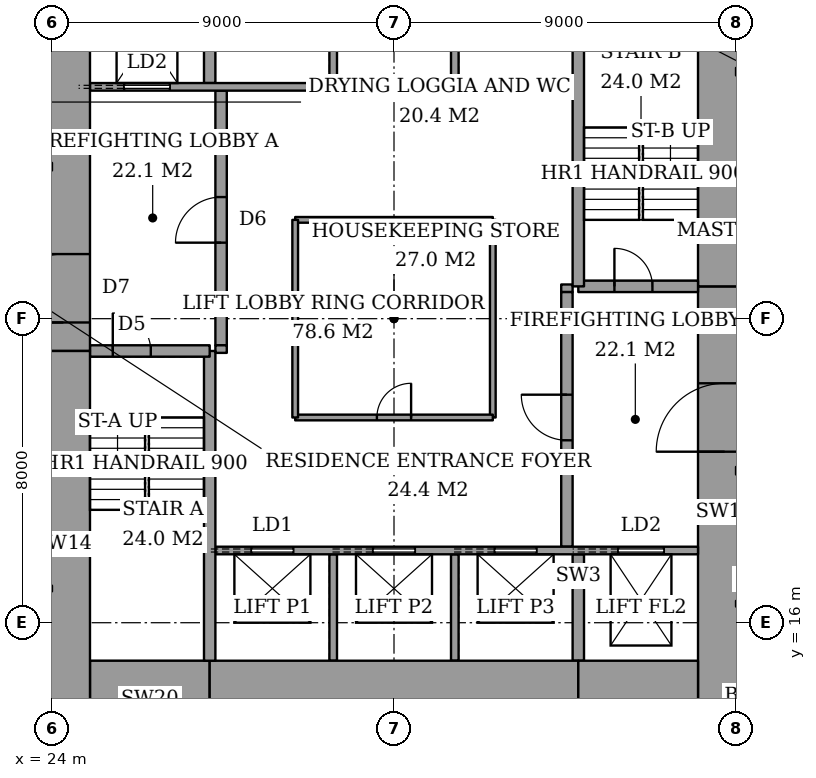
"""IFC4 building model, lengths in metres.
Left out: names, types, materials, properties, quantities, classifications, styles, units other than length and angle.
Written with IfcOpenShell. Run it as: python <this file> out.ifc"""

import sys

from ifc_helpers import new_model, si_unit, direction, frame, frame_2d, origin, place, context, subcontext, project, spatial, rectangle, extrude, element, fill, save


model = new_model("IFC4")
c1 = context("Model", 3, precision=1e-05, world=origin(), true_north=direction((0.0, 1.0)))
c2 = subcontext(c1, "Body", "Model", "MODEL_VIEW")
j1 = project(units=[si_unit("LENGTHUNIT", "METRE"), si_unit("PLANEANGLEUNIT", "RADIAN")], contexts=[c1])
p1 = place(None, origin())
s1 = spatial("IfcSite", under=j1, at=p1, CompositionType="ELEMENT")
p2 = place(p1, origin())
s2 = spatial("IfcBuilding", under=s1, at=p2, CompositionType="ELEMENT")
p3 = place(p2, frame((0.0, 0.0, 62.0)))
s3 = spatial("IfcBuildingStorey", under=s2, at=p3, CompositionType="ELEMENT", Elevation=62.0)
p4 = place(p3, frame((25.0, 14.0, 0.0), z_axis=(0.0, 0.0, 1.0), x_axis=(1.0, 0.0, 0.0)))
e1 = element("IfcWall", 1, at=p4, inside=s3, PredefinedType="SHEAR", context=c2, shape_type="SweptSolid", body=[
    extrude(rectangle(XDim=3.15, YDim=2.0, at=frame_2d((1.575, 0.0))), origin(), (0.0, 0.0, 1.0), 3.6),
])
p5 = place(p3, frame((28.15, 14.0, 0.0), z_axis=(0.0, 0.0, 1.0), x_axis=(1.0, 0.0, 0.0)))
e2 = element("IfcWall", 2, at=p5, inside=s3, PredefinedType="SHEAR", context=c2, shape_type="SweptSolid", body=[
    extrude(rectangle(XDim=9.7, YDim=2.0, at=frame_2d((4.85, 0.0))), origin(), (0.0, 0.0, 1.0), 3.6),
])
p6 = place(p3, frame((37.85, 14.0, 0.0), z_axis=(0.0, 0.0, 1.0), x_axis=(1.0, 0.0, 0.0)))
e3 = element("IfcWall", 3, at=p6, inside=s3, PredefinedType="SHEAR", context=c2, shape_type="SweptSolid", body=[
    extrude(rectangle(XDim=3.15, YDim=2.0, at=frame_2d((1.575, 0.0))), origin(), (0.0, 0.0, 1.0), 3.6),
])
p7 = place(p3, frame((24.3, 13.0, 0.0), z_axis=(0.0, 0.0, 1.0), x_axis=(0.0, 1.0, 0.0)))
e4 = element("IfcWall", 4, at=p7, inside=s3, PredefinedType="SHEAR", context=c2, shape_type="SweptSolid", body=[
    extrude(rectangle(XDim=10.15, YDim=1.4, at=frame_2d((5.075, 0.0))), origin(), (0.0, 0.0, 1.0), 3.6),
])
p8 = place(p3, frame((24.3, 23.15, 0.0), z_axis=(0.0, 0.0, 1.0), x_axis=(0.0, 1.0, 0.0)))
e5 = element("IfcWall", 5, at=p8, inside=s3, PredefinedType="SHEAR", context=c2, shape_type="SweptSolid", body=[
    extrude(rectangle(XDim=11.85, YDim=1.4, at=frame_2d((5.925, 0.0))), origin(), (0.0, 0.0, 1.0), 3.6),
])
p9 = place(p8, frame((0.75, 0.0, 0.0)))
e6 = element("IfcOpeningElement", 6, at=p9, cuts=e5, PredefinedType="OPENING", context=c2, shape_type="SweptSolid", body=[
    extrude(rectangle(XDim=1.8, YDim=2.4, at=frame_2d((0.9, 1.2))), frame((0.0, 0.71, 0.0), z_axis=(0.0, -1.0, 0.0), x_axis=(1.0, 0.0, 0.0)), (0.0, 0.0, 1.0), 1.42),
])
p10 = place(p3, frame((41.7, 13.0, 0.0), z_axis=(0.0, 0.0, 1.0), x_axis=(0.0, 1.0, 0.0)))
e7 = element("IfcWall", 7, at=p10, inside=s3, PredefinedType="SHEAR", context=c2, shape_type="SweptSolid", body=[
    extrude(rectangle(XDim=11.85, YDim=1.4, at=frame_2d((5.925, 0.0))), origin(), (0.0, 0.0, 1.0), 3.6),
])
p11 = place(p10, frame((7.5, 0.0, 0.0)))
e8 = element("IfcOpeningElement", 8, at=p11, cuts=e7, PredefinedType="OPENING", context=c2, shape_type="SweptSolid", body=[
    extrude(rectangle(XDim=1.8, YDim=2.4, at=frame_2d((0.9, 1.2))), frame((0.0, 0.71, 0.0), z_axis=(0.0, -1.0, 0.0), x_axis=(1.0, 0.0, 0.0)), (0.0, 0.0, 1.0), 1.42),
])
p12 = place(p3, frame((41.7, 24.85, 0.0), z_axis=(0.0, 0.0, 1.0), x_axis=(0.0, 1.0, 0.0)))
e9 = element("IfcWall", 9, at=p12, inside=s3, PredefinedType="SHEAR", context=c2, shape_type="SweptSolid", body=[
    extrude(rectangle(XDim=10.15, YDim=1.4, at=frame_2d((5.075, 0.0))), origin(), (0.0, 0.0, 1.0), 3.6),
])
p13 = place(p3, frame((28.15, 15.0, 0.0), z_axis=(0.0, 0.0, 1.0), x_axis=(0.0, 1.0, 0.0)))
e10 = element("IfcWall", 10, at=p13, inside=s3, PredefinedType="SHEAR", context=c2, shape_type="SweptSolid", body=[
    extrude(rectangle(XDim=8.15, YDim=0.3, at=frame_2d((4.075, 0.0))), origin(), (0.0, 0.0, 1.0), 3.6),
])
p14 = place(p3, frame((25.0, 23.15, 0.0), z_axis=(0.0, 0.0, 1.0), x_axis=(1.0, 0.0, 0.0)))
e11 = element("IfcWall", 11, at=p14, inside=s3, PredefinedType="SHEAR", context=c2, shape_type="SweptSolid", body=[
    extrude(rectangle(XDim=3.15, YDim=0.3, at=frame_2d((1.575, 0.0))), origin(), (0.0, 0.0, 1.0), 3.6),
])
p15 = place(p14, frame((0.6, 0.0, 0.0)))
e12 = element("IfcOpeningElement", 12, at=p15, cuts=e11, PredefinedType="OPENING", context=c2, shape_type="SweptSolid", body=[
    extrude(rectangle(XDim=1.0, YDim=2.1, at=frame_2d((0.5, 1.05))), frame((0.0, 0.16, 0.0), z_axis=(0.0, -1.0, 0.0), x_axis=(1.0, 0.0, 0.0)), (0.0, 0.0, 1.0), 0.32),
])
p16 = place(p3, frame((37.85, 24.85, 0.0), z_axis=(0.0, 0.0, 1.0), x_axis=(0.0, 1.0, 0.0)))
e13 = element("IfcWall", 13, at=p16, inside=s3, PredefinedType="SHEAR", context=c2, shape_type="SweptSolid", body=[
    extrude(rectangle(XDim=8.15, YDim=0.3, at=frame_2d((4.075, 0.0))), origin(), (0.0, 0.0, 1.0), 3.6),
])
p17 = place(p3, frame((37.85, 24.85, 0.0), z_axis=(0.0, 0.0, 1.0), x_axis=(1.0, 0.0, 0.0)))
e14 = element("IfcWall", 14, at=p17, inside=s3, PredefinedType="SHEAR", context=c2, shape_type="SweptSolid", body=[
    extrude(rectangle(XDim=3.15, YDim=0.3, at=frame_2d((1.575, 0.0))), origin(), (0.0, 0.0, 1.0), 3.6),
])
p18 = place(p17, frame((0.95, 0.0, 0.0)))
e15 = element("IfcOpeningElement", 15, at=p18, cuts=e14, PredefinedType="OPENING", context=c2, shape_type="SweptSolid", body=[
    extrude(rectangle(XDim=1.0, YDim=2.1, at=frame_2d((0.5, 1.05))), frame((0.0, 0.16, 0.0), z_axis=(0.0, -1.0, 0.0), x_axis=(1.0, 0.0, 0.0)), (0.0, 0.0, 1.0), 0.32),
])
p19 = place(p3, frame((28.45, 23.3, 0.0), z_axis=(0.0, 0.0, 1.0), x_axis=(0.0, 1.0, 0.0)))
e16 = element("IfcWall", 16, at=p19, inside=s3, PredefinedType="PARTITIONING", context=c2, shape_type="SweptSolid", body=[
    extrude(rectangle(XDim=6.7, YDim=0.3, at=frame_2d((3.35, 0.0))), origin(), (0.0, 0.0, 1.0), 3.6),
])
p20 = place(p19, frame((2.7, 0.0, 0.0)))
e17 = element("IfcOpeningElement", 17, at=p20, cuts=e16, PredefinedType="OPENING", context=c2, shape_type="SweptSolid", body=[
    extrude(rectangle(XDim=1.2, YDim=2.1, at=frame_2d((0.6, 1.05))), frame((0.0, 0.16, 0.0), z_axis=(0.0, -1.0, 0.0), x_axis=(1.0, 0.0, 0.0)), (0.0, 0.0, 1.0), 0.32),
])
p21 = place(p3, frame((37.55, 18.0, 0.0), z_axis=(0.0, 0.0, 1.0), x_axis=(0.0, 1.0, 0.0)))
e18 = element("IfcWall", 18, at=p21, inside=s3, PredefinedType="PARTITIONING", context=c2, shape_type="SweptSolid", body=[
    extrude(rectangle(XDim=6.7, YDim=0.3, at=frame_2d((3.35, 0.0))), origin(), (0.0, 0.0, 1.0), 3.6),
])
p22 = place(p21, frame((2.8, 0.0, 0.0)))
e19 = element("IfcOpeningElement", 19, at=p22, cuts=e18, PredefinedType="OPENING", context=c2, shape_type="SweptSolid", body=[
    extrude(rectangle(XDim=1.2, YDim=2.1, at=frame_2d((0.6, 1.05))), frame((0.0, 0.16, 0.0), z_axis=(0.0, -1.0, 0.0), x_axis=(1.0, 0.0, 0.0)), (0.0, 0.0, 1.0), 0.32),
])
p23 = place(p3, frame((28.3, 17.9, 0.0), z_axis=(0.0, 0.0, 1.0), x_axis=(1.0, 0.0, 0.0)))
e20 = element("IfcWall", 20, at=p23, inside=s3, PredefinedType="PARTITIONING", context=c2, shape_type="SweptSolid", body=[
    extrude(rectangle(XDim=12.7, YDim=0.2, at=frame_2d((6.35, 0.0))), origin(), (0.0, 0.0, 1.0), 3.6),
])
p24 = place(p23, frame((0.95, 0.0, 0.0)))
e21 = element("IfcOpeningElement", 21, at=p24, cuts=e20, PredefinedType="OPENING", context=c2, shape_type="SweptSolid", body=[
    extrude(rectangle(XDim=1.1, YDim=2.1, at=frame_2d((0.55, 1.05))), frame((0.0, 0.11, 0.0), z_axis=(0.0, -1.0, 0.0), x_axis=(1.0, 0.0, 0.0)), (0.0, 0.0, 1.0), 0.22),
])
p25 = place(p23, frame((4.15, 0.0, 0.0)))
e22 = element("IfcOpeningElement", 22, at=p25, cuts=e20, PredefinedType="OPENING", context=c2, shape_type="SweptSolid", body=[
    extrude(rectangle(XDim=1.1, YDim=2.1, at=frame_2d((0.55, 1.05))), frame((0.0, 0.11, 0.0), z_axis=(0.0, -1.0, 0.0), x_axis=(1.0, 0.0, 0.0)), (0.0, 0.0, 1.0), 0.22),
])
p26 = place(p23, frame((7.35, 0.0, 0.0)))
e23 = element("IfcOpeningElement", 23, at=p26, cuts=e20, PredefinedType="OPENING", context=c2, shape_type="SweptSolid", body=[
    extrude(rectangle(XDim=1.1, YDim=2.1, at=frame_2d((0.55, 1.05))), frame((0.0, 0.11, 0.0), z_axis=(0.0, -1.0, 0.0), x_axis=(1.0, 0.0, 0.0)), (0.0, 0.0, 1.0), 0.22),
])
p27 = place(p23, frame((10.6, 0.0, 0.0)))
e24 = element("IfcOpeningElement", 24, at=p27, cuts=e20, PredefinedType="OPENING", context=c2, shape_type="SweptSolid", body=[
    extrude(rectangle(XDim=1.2, YDim=2.1, at=frame_2d((0.6, 1.05))), frame((0.0, 0.11, 0.0), z_axis=(0.0, -1.0, 0.0), x_axis=(1.0, 0.0, 0.0)), (0.0, 0.0, 1.0), 0.22),
])
p28 = place(p3, frame((25.0, 30.1, 0.0), z_axis=(0.0, 0.0, 1.0), x_axis=(1.0, 0.0, 0.0)))
e25 = element("IfcWall", 25, at=p28, inside=s3, PredefinedType="PARTITIONING", context=c2, shape_type="SweptSolid", body=[
    extrude(rectangle(XDim=12.7, YDim=0.2, at=frame_2d((6.35, 0.0))), origin(), (0.0, 0.0, 1.0), 3.6),
])
p29 = place(p28, frame((0.9, 0.0, 0.0)))
e26 = element("IfcOpeningElement", 26, at=p29, cuts=e25, PredefinedType="OPENING", context=c2, shape_type="SweptSolid", body=[
    extrude(rectangle(XDim=1.2, YDim=2.1, at=frame_2d((0.6, 1.05))), frame((0.0, 0.11, 0.0), z_axis=(0.0, -1.0, 0.0), x_axis=(1.0, 0.0, 0.0)), (0.0, 0.0, 1.0), 0.22),
])
for number, where, z_axis, x_axis in (
    (27, (31.4, 15.0, 0.0), (0.0, 0.0, 1.0), (0.0, 1.0, 0.0)),
    (28, (34.6, 15.0, 0.0), (0.0, 0.0, 1.0), (0.0, 1.0, 0.0)),
):
    element("IfcWall", number, at=place(p3, frame(where, z_axis=z_axis, x_axis=x_axis)), inside=s3, PredefinedType="PARTITIONING", context=c2, shape_type="SweptSolid", body=[
        extrude(rectangle(XDim=2.8, YDim=0.2, at=frame_2d((1.4, 0.0))), origin(), (0.0, 0.0, 1.0), 3.6),
    ])
p30 = place(p3, frame((37.85, 15.0, 0.0), z_axis=(0.0, 0.0, 1.0), x_axis=(0.0, 1.0, 0.0)))
e29 = element("IfcWall", 29, at=p30, inside=s3, PredefinedType="SHEAR", context=c2, shape_type="SweptSolid", body=[
    extrude(rectangle(XDim=2.8, YDim=0.3, at=frame_2d((1.4, 0.0))), origin(), (0.0, 0.0, 1.0), 3.6),
])
for number, where, z_axis, x_axis in (
    (30, (31.4, 30.2, 0.0), (0.0, 0.0, 1.0), (0.0, 1.0, 0.0)),
    (31, (34.6, 30.2, 0.0), (0.0, 0.0, 1.0), (0.0, 1.0, 0.0)),
):
    element("IfcWall", number, at=place(p3, frame(where, z_axis=z_axis, x_axis=x_axis)), inside=s3, PredefinedType="PARTITIONING", context=c2, shape_type="SweptSolid", body=[
        extrude(rectangle(XDim=2.8, YDim=0.2, at=frame_2d((1.4, 0.0))), origin(), (0.0, 0.0, 1.0), 3.6),
    ])
p31 = place(p3, frame((28.15, 30.2, 0.0), z_axis=(0.0, 0.0, 1.0), x_axis=(0.0, 1.0, 0.0)))
e32 = element("IfcWall", 32, at=p31, inside=s3, PredefinedType="SHEAR", context=c2, shape_type="SweptSolid", body=[
    extrude(rectangle(XDim=2.8, YDim=0.3, at=frame_2d((1.4, 0.0))), origin(), (0.0, 0.0, 1.0), 3.6),
])
for number, where, z_axis, x_axis in (
    (33, (28.3, 23.2, 0.0), (0.0, 0.0, 1.0), (1.0, 0.0, 0.0)),
    (34, (37.4, 24.8, 0.0), (0.0, 0.0, 1.0), (1.0, 0.0, 0.0)),
):
    element("IfcWall", number, at=place(p3, frame(where, z_axis=z_axis, x_axis=x_axis)), inside=s3, PredefinedType="PARTITIONING", context=c2, shape_type="SweptSolid", body=[
        extrude(rectangle(XDim=0.3, YDim=0.2, at=frame_2d((0.15, 0.0))), origin(), (0.0, 0.0, 1.0), 3.6),
    ])
p32 = place(p3, frame((30.4, 21.4, 0.0), z_axis=(0.0, 0.0, 1.0), x_axis=(1.0, 0.0, 0.0)))
e35 = element("IfcWall", 35, at=p32, inside=s3, PredefinedType="PARTITIONING", context=c2, shape_type="SweptSolid", body=[
    extrude(rectangle(XDim=5.2, YDim=0.15, at=frame_2d((2.6, 0.0))), origin(), (0.0, 0.0, 1.0), 3.35),
])
p33 = place(p32, frame((2.15, 0.0, 0.0)))
e36 = element("IfcOpeningElement", 36, at=p33, cuts=e35, PredefinedType="OPENING", context=c2, shape_type="SweptSolid", body=[
    extrude(rectangle(XDim=0.9, YDim=2.1, at=frame_2d((0.45, 1.05))), frame((0.0, 0.085, 0.0), z_axis=(0.0, -1.0, 0.0), x_axis=(1.0, 0.0, 0.0)), (0.0, 0.0, 1.0), 0.17),
])
for number, where, z_axis, x_axis in (
    (37, (30.4, 26.6, 0.0), (0.0, 0.0, 1.0), (1.0, 0.0, 0.0)),
    (38, (30.4, 21.4, 0.0), (0.0, 0.0, 1.0), (0.0, 1.0, 0.0)),
    (39, (35.6, 21.4, 0.0), (0.0, 0.0, 1.0), (0.0, 1.0, 0.0)),
):
    element("IfcWall", number, at=place(p3, frame(where, z_axis=z_axis, x_axis=x_axis)), inside=s3, PredefinedType="PARTITIONING", context=c2, shape_type="SweptSolid", body=[
        extrude(rectangle(XDim=5.2, YDim=0.15, at=frame_2d((2.6, 0.0))), origin(), (0.0, 0.0, 1.0), 3.35),
    ])
p34 = place(p15, origin())
e40 = element("IfcDoor", 40, at=p34, inside=s3, OperationType="SINGLE_SWING_RIGHT", PredefinedType="DOOR", context=c2, shape_type="SweptSolid", body=[
    extrude(rectangle(XDim=1.0, YDim=2.1, at=frame_2d((0.5, 1.05))), frame((0.0, 0.025, 0.0), z_axis=(0.0, -1.0, 0.0), x_axis=(1.0, 0.0, 0.0)), (0.0, 0.0, 1.0), 0.05),
])
fill(e12, e40)
p35 = place(p18, origin())
e41 = element("IfcDoor", 41, at=p35, inside=s3, OperationType="SINGLE_SWING_RIGHT", PredefinedType="DOOR", context=c2, shape_type="SweptSolid", body=[
    extrude(rectangle(XDim=1.0, YDim=2.1, at=frame_2d((0.5, 1.05))), frame((0.0, 0.025, 0.0), z_axis=(0.0, -1.0, 0.0), x_axis=(1.0, 0.0, 0.0)), (0.0, 0.0, 1.0), 0.05),
])
fill(e15, e41)
p36 = place(p20, origin())
e42 = element("IfcDoor", 42, at=p36, inside=s3, OperationType="SINGLE_SWING_RIGHT", PredefinedType="DOOR", context=c2, shape_type="SweptSolid", body=[
    extrude(rectangle(XDim=1.2, YDim=2.1, at=frame_2d((0.6, 1.05))), frame((0.0, 0.025, 0.0), z_axis=(0.0, -1.0, 0.0), x_axis=(1.0, 0.0, 0.0)), (0.0, 0.0, 1.0), 0.05),
])
fill(e17, e42)
p37 = place(p22, origin())
e43 = element("IfcDoor", 43, at=p37, inside=s3, OperationType="SINGLE_SWING_LEFT", PredefinedType="DOOR", context=c2, shape_type="SweptSolid", body=[
    extrude(rectangle(XDim=1.2, YDim=2.1, at=frame_2d((0.6, 1.05))), frame((0.0, 0.025, 0.0), z_axis=(0.0, -1.0, 0.0), x_axis=(1.0, 0.0, 0.0)), (0.0, 0.0, 1.0), 0.05),
])
fill(e19, e43)
p38 = place(p9, origin())
e44 = element("IfcDoor", 44, at=p38, inside=s3, OperationType="DOUBLE_DOOR_DOUBLE_SWING", PredefinedType="DOOR", context=c2, shape_type="SweptSolid", body=[
    extrude(rectangle(XDim=1.8, YDim=2.4, at=frame_2d((0.9, 1.2))), frame((0.0, 0.025, 0.0), z_axis=(0.0, -1.0, 0.0), x_axis=(1.0, 0.0, 0.0)), (0.0, 0.0, 1.0), 0.05),
])
fill(e6, e44)
p39 = place(p11, origin())
e45 = element("IfcDoor", 45, at=p39, inside=s3, OperationType="DOUBLE_DOOR_DOUBLE_SWING", PredefinedType="DOOR", context=c2, shape_type="SweptSolid", body=[
    extrude(rectangle(XDim=1.8, YDim=2.4, at=frame_2d((0.9, 1.2))), frame((0.0, 0.025, 0.0), z_axis=(0.0, -1.0, 0.0), x_axis=(1.0, 0.0, 0.0)), (0.0, 0.0, 1.0), 0.05),
])
fill(e8, e45)
p40 = place(p33, origin())
e46 = element("IfcDoor", 46, at=p40, inside=s3, OperationType="SINGLE_SWING_LEFT", PredefinedType="DOOR", context=c2, shape_type="SweptSolid", body=[
    extrude(rectangle(XDim=0.9, YDim=2.1, at=frame_2d((0.45, 1.05))), frame((0.0, 0.025, 0.0), z_axis=(0.0, -1.0, 0.0), x_axis=(1.0, 0.0, 0.0)), (0.0, 0.0, 1.0), 0.05),
])
fill(e36, e46)
p41 = place(p24, origin())
e47 = element("IfcDoor", 47, at=p41, inside=s3, OperationType="SLIDING_TO_LEFT", PredefinedType="DOOR", context=c2, shape_type="SweptSolid", body=[
    extrude(rectangle(XDim=1.1, YDim=2.1, at=frame_2d((0.55, 1.05))), frame((0.0, 0.025, 0.0), z_axis=(0.0, -1.0, 0.0), x_axis=(1.0, 0.0, 0.0)), (0.0, 0.0, 1.0), 0.05),
])
fill(e21, e47)
p42 = place(p25, origin())
e48 = element("IfcDoor", 48, at=p42, inside=s3, OperationType="SLIDING_TO_LEFT", PredefinedType="DOOR", context=c2, shape_type="SweptSolid", body=[
    extrude(rectangle(XDim=1.1, YDim=2.1, at=frame_2d((0.55, 1.05))), frame((0.0, 0.025, 0.0), z_axis=(0.0, -1.0, 0.0), x_axis=(1.0, 0.0, 0.0)), (0.0, 0.0, 1.0), 0.05),
])
fill(e22, e48)
p43 = place(p26, origin())
e49 = element("IfcDoor", 49, at=p43, inside=s3, OperationType="SLIDING_TO_LEFT", PredefinedType="DOOR", context=c2, shape_type="SweptSolid", body=[
    extrude(rectangle(XDim=1.1, YDim=2.1, at=frame_2d((0.55, 1.05))), frame((0.0, 0.025, 0.0), z_axis=(0.0, -1.0, 0.0), x_axis=(1.0, 0.0, 0.0)), (0.0, 0.0, 1.0), 0.05),
])
fill(e23, e49)
p44 = place(p29, origin())
e50 = element("IfcDoor", 50, at=p44, inside=s3, OperationType="SLIDING_TO_LEFT", PredefinedType="DOOR", context=c2, shape_type="SweptSolid", body=[
    extrude(rectangle(XDim=1.2, YDim=2.1, at=frame_2d((0.6, 1.05))), frame((0.0, 0.025, 0.0), z_axis=(0.0, -1.0, 0.0), x_axis=(1.0, 0.0, 0.0)), (0.0, 0.0, 1.0), 0.05),
])
fill(e26, e50)
p45 = place(p27, origin())
e51 = element("IfcDoor", 51, at=p45, inside=s3, OperationType="SLIDING_TO_LEFT", PredefinedType="DOOR", context=c2, shape_type="SweptSolid", body=[
    extrude(rectangle(XDim=1.2, YDim=2.1, at=frame_2d((0.6, 1.05))), frame((0.0, 0.025, 0.0), z_axis=(0.0, -1.0, 0.0), x_axis=(1.0, 0.0, 0.0)), (0.0, 0.0, 1.0), 0.05),
])
fill(e24, e51)
save(model, sys.argv[1])
